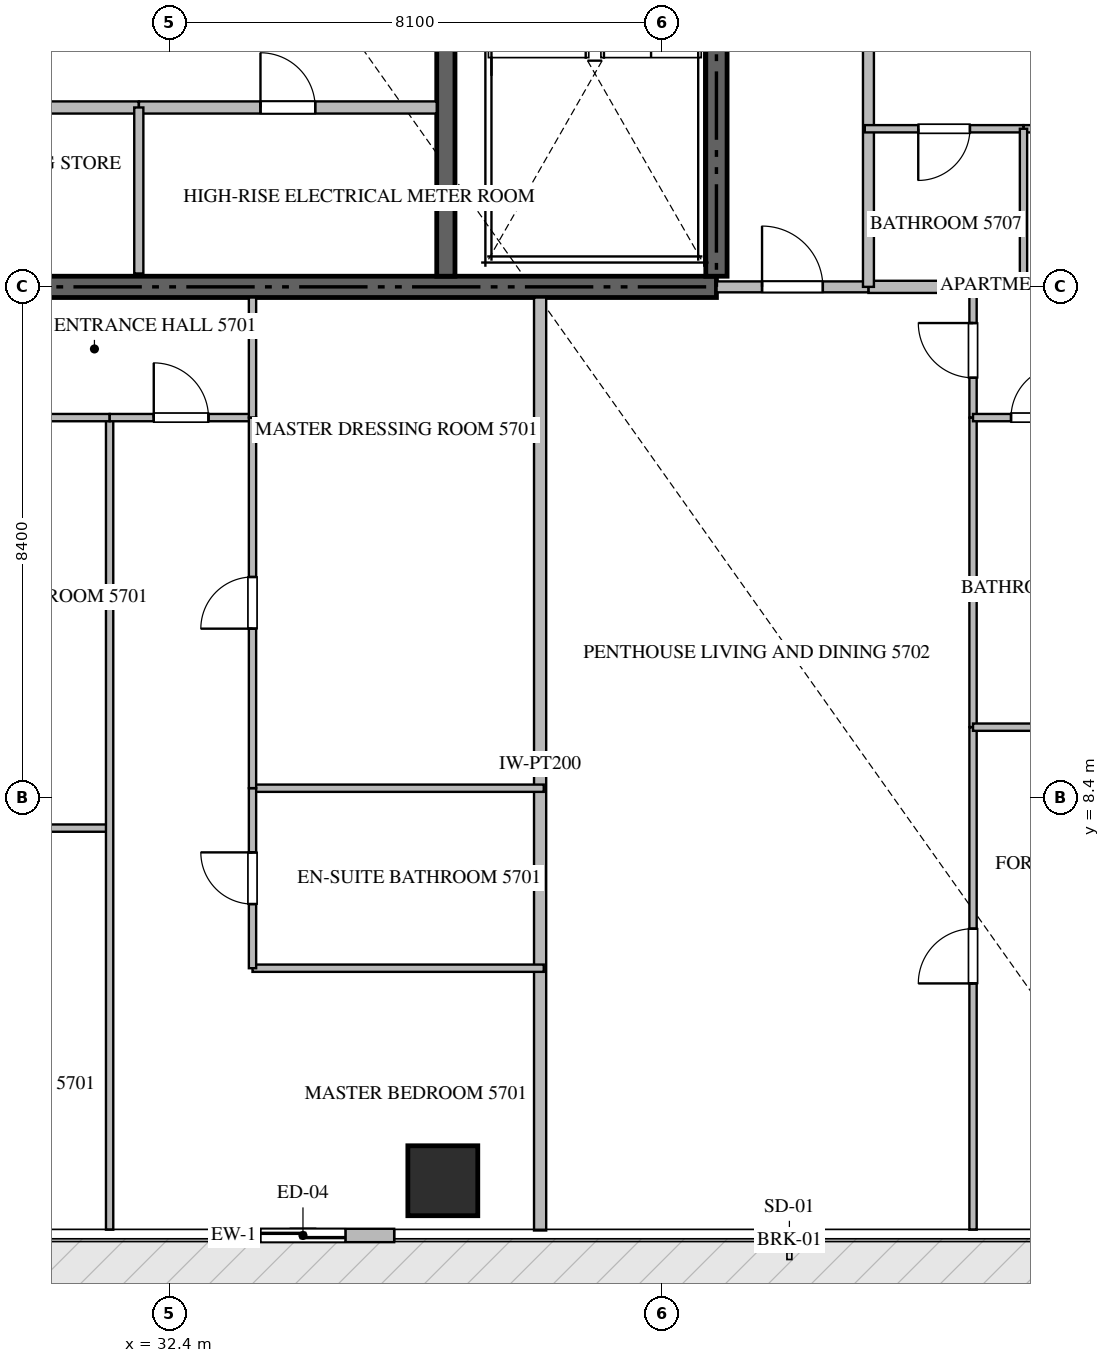
"""IFC4 building model, lengths in metres.
Left out: names, types, materials, properties, quantities, classifications, styles, units other than length and angle.
Written with IfcOpenShell. Run it as: python <this file> out.ifc"""

import sys

from ifc_helpers import new_model, si_unit, direction, frame, frame_2d, origin, origin_2d, place, context, subcontext, project, spatial, rectangle, extrude, source, transform, mapped, element, fill, save


model = new_model("IFC4")
c1 = context("Model", 3, precision=1e-05, world=origin(), true_north=direction((0.0, 1.0)))
c2 = subcontext(c1, "Body", "Model", "MODEL_VIEW")
j1 = project(units=[si_unit("LENGTHUNIT", "METRE"), si_unit("PLANEANGLEUNIT", "RADIAN")], contexts=[c1])
p1 = place(None, origin())
s1 = spatial("IfcSite", under=j1, at=p1, CompositionType="ELEMENT")
p2 = place(p1, origin())
s2 = spatial("IfcBuilding", under=s1, at=p2, CompositionType="ELEMENT")
p3 = place(p2, frame((0.0, 0.0, 229.7)))
s3 = spatial("IfcBuildingStorey", under=s2, at=p3, CompositionType="ELEMENT", Elevation=229.7)
p4 = place(p3, frame((23.4, 16.8, -0.26), z_axis=(0.0, 0.0, 1.0), x_axis=(1.0, 0.0, 0.0)))
e1 = element("IfcWall", 1, at=p4, inside=s3, PredefinedType="SHEAR", context=c2, shape_type="SweptSolid", body=[
    extrude(rectangle(XDim=18.0, YDim=0.35, at=frame_2d((9.0, 0.0))), origin(), (0.0, 0.0, 1.0), 3.848),
])
p5 = place(p3, frame((41.4, 16.975, -0.26), z_axis=(0.0, 0.0, 1.0), x_axis=(0.0, 1.0, 0.0)))
e2 = element("IfcWall", 2, at=p5, inside=s3, PredefinedType="SHEAR", context=c2, shape_type="SweptSolid", body=[
    extrude(rectangle(XDim=8.375, YDim=0.35, at=frame_2d((4.188, 0.0))), origin(), (0.0, 0.0, 1.0), 3.848),
])
p6 = place(p3, frame((36.95, 16.975, -0.26), z_axis=(0.0, 0.0, 1.0), x_axis=(0.0, 1.0, 0.0)))
e3 = element("IfcWall", 3, at=p6, inside=s3, PredefinedType="SHEAR", context=c2, shape_type="SweptSolid", body=[
    extrude(rectangle(XDim=8.375, YDim=0.3, at=frame_2d((4.188, 0.0))), origin(), (0.0, 0.0, 1.0), 3.848),
])
m1 = source(origin(), c2, "Body", "SweptSolid", [
    extrude(rectangle(XDim=1.15, YDim=1.15, at=origin_2d()), origin(), (0.0, 0.0, 1.0), 3.85),
])
p7 = place(p3, frame((36.9, 2.1, -0.26), z_axis=(0.0, 0.0, 1.0), x_axis=(1.0, 0.0, 0.0)))
e4 = element("IfcColumn", 4, at=p7, inside=s3, PredefinedType="COLUMN", context=c2, shape_type="MappedRepresentation", body=[
    mapped(m1, transform((0.0, 0.0, 0.0), scale=1.0)),
])
p8 = place(p3, frame((33.1, 1.2, 0.0), z_axis=(0.0, 0.0, 1.0), x_axis=(1.0, 0.0, 0.0)))
e5 = element("IfcWall", 5, at=p8, inside=s3, PredefinedType="ELEMENTEDWALL", context=c2, shape_type="SweptSolid", body=[
    extrude(rectangle(XDim=3.0, YDim=0.22, at=frame_2d((1.5, 0.0))), origin(), (0.0, 0.0, 1.0), 3.575),
])
p9 = place(p8, frame((0.8, 0.0, 0.0)))
e6 = element("IfcOpeningElement", 6, at=p9, cuts=e5, PredefinedType="OPENING", context=c2, shape_type="SweptSolid", body=[
    extrude(rectangle(XDim=1.4, YDim=2.25, at=frame_2d((0.7, 1.125))), frame((0.0, 0.12, 0.0), z_axis=(0.0, -1.0, 0.0), x_axis=(1.0, 0.0, 0.0)), (0.0, 0.0, 1.0), 0.24),
])
p10 = place(p3, frame((28.0, 19.75, 0.0), z_axis=(0.0, 0.0, 1.0), x_axis=(1.0, 0.0, 0.0)))
e7 = element("IfcWall", 7, at=p10, inside=s3, PredefinedType="STANDARD", context=c2, shape_type="SweptSolid", body=[
    extrude(rectangle(XDim=3.9, YDim=0.2, at=frame_2d((1.95, 0.0))), origin(), (0.0, 0.0, 1.0), 3.59),
])
p11 = place(p10, frame((1.5, 0.0, 0.0)))
e8 = element("IfcOpeningElement", 8, at=p11, cuts=e7, PredefinedType="OPENING", context=c2, shape_type="SweptSolid", body=[
    extrude(rectangle(XDim=0.9, YDim=2.1, at=frame_2d((0.45, 1.05))), frame((0.0, 0.11, 0.0), z_axis=(0.0, -1.0, 0.0), x_axis=(1.0, 0.0, 0.0)), (0.0, 0.0, 1.0), 0.22),
])
p12 = place(p3, frame((31.902, 19.75, 0.0), z_axis=(0.0, 0.0, 1.0), x_axis=(1.0, 0.0, 0.0)))
e9 = element("IfcWall", 9, at=p12, inside=s3, PredefinedType="STANDARD", context=c2, shape_type="SweptSolid", body=[
    extrude(rectangle(XDim=4.898, YDim=0.2, at=frame_2d((2.449, 0.0))), origin(), (0.0, 0.0, 1.0), 3.59),
])
p13 = place(p12, frame((1.999, 0.0, 0.0)))
e10 = element("IfcOpeningElement", 10, at=p13, cuts=e9, PredefinedType="OPENING", context=c2, shape_type="SweptSolid", body=[
    extrude(rectangle(XDim=0.9, YDim=2.1, at=frame_2d((0.45, 1.05))), frame((0.0, 0.11, 0.0), z_axis=(0.0, -1.0, 0.0), x_axis=(1.0, 0.0, 0.0)), (0.0, 0.0, 1.0), 0.22),
])
p14 = place(p3, frame((31.9, 17.02, 0.0), z_axis=(0.0, 0.0, 1.0), x_axis=(0.0, 1.0, 0.0)))
e11 = element("IfcWall", 11, at=p14, inside=s3, PredefinedType="PARTITIONING", context=c2, shape_type="SweptSolid", body=[
    extrude(rectangle(XDim=2.73, YDim=0.15, at=frame_2d((1.365, 0.0))), origin(), (0.0, 0.0, 1.0), 3.59),
])
p15 = place(p3, frame((38.5, 1.282, 0.0), z_axis=(0.0, 0.0, 1.0), x_axis=(0.0, 1.0, 0.0)))
e12 = element("IfcWall", 12, at=p15, inside=s3, PredefinedType="PARTITIONING", context=c2, shape_type="SweptSolid", body=[
    extrude(rectangle(XDim=15.343, YDim=0.2, at=frame_2d((7.671, 0.0))), origin(), (0.0, 0.0, 1.0), 3.59),
])
p16 = place(p3, frame((43.9, 16.8, 0.0), z_axis=(0.0, 0.0, 1.0), x_axis=(1.0, 0.0, 0.0)))
e13 = element("IfcWall", 13, at=p16, inside=s3, PredefinedType="PARTITIONING", context=c2, shape_type="SweptSolid", body=[
    extrude(rectangle(XDim=13.418, YDim=0.2, at=frame_2d((6.709, 0.0))), origin(), (0.0, 0.0, 1.0), 3.59),
])
p17 = place(p3, frame((41.402, 16.8, 0.0), z_axis=(0.0, 0.0, 1.0), x_axis=(1.0, 0.0, 0.0)))
e14 = element("IfcWall", 14, at=p17, inside=s3, PredefinedType="PARTITIONING", context=c2, shape_type="SweptSolid", body=[
    extrude(rectangle(XDim=2.496, YDim=0.18, at=frame_2d((1.248, 0.0))), origin(), (0.0, 0.0, 1.0), 3.59),
])
p18 = place(p17, frame((0.748, 0.0, 0.0)))
e15 = element("IfcOpeningElement", 15, at=p18, cuts=e14, PredefinedType="OPENING", context=c2, shape_type="SweptSolid", body=[
    extrude(rectangle(XDim=1.0, YDim=2.15, at=frame_2d((0.5, 1.075))), frame((0.0, 0.1, 0.0), z_axis=(0.0, -1.0, 0.0), x_axis=(1.0, 0.0, 0.0)), (0.0, 0.0, 1.0), 0.2),
])
p19 = place(p3, frame((43.9, 16.8, 0.0), z_axis=(0.0, 0.0, 1.0), x_axis=(0.0, 1.0, 0.0)))
e16 = element("IfcWall", 16, at=p19, inside=s3, PredefinedType="PARTITIONING", context=c2, shape_type="SweptSolid", body=[
    extrude(rectangle(XDim=16.8, YDim=0.18, at=frame_2d((8.4, 0.0))), origin(), (0.0, 0.0, 1.0), 3.59),
])
p20 = place(p19, frame((4.392, 0.0, 0.0)))
e17 = element("IfcOpeningElement", 17, at=p20, cuts=e16, PredefinedType="OPENING", context=c2, shape_type="SweptSolid", body=[
    extrude(rectangle(XDim=1.0, YDim=2.15, at=frame_2d((0.5, 1.075))), frame((0.0, 0.1, 0.0), z_axis=(0.0, -1.0, 0.0), x_axis=(1.0, 0.0, 0.0)), (0.0, 0.0, 1.0), 0.2),
])
p21 = place(p19, frame((8.595, 0.0, 0.0)))
e18 = element("IfcOpeningElement", 18, at=p21, cuts=e16, PredefinedType="OPENING", context=c2, shape_type="SweptSolid", body=[
    extrude(rectangle(XDim=1.0, YDim=2.15, at=frame_2d((0.5, 1.075))), frame((0.0, 0.1, 0.0), z_axis=(0.0, -1.0, 0.0), x_axis=(1.0, 0.0, 0.0)), (0.0, 0.0, 1.0), 0.2),
])
p22 = place(p3, frame((26.3, 7.899, 0.0), z_axis=(0.0, 0.0, 1.0), x_axis=(1.0, 0.0, 0.0)))
e19 = element("IfcWall", 19, at=p22, inside=s3, PredefinedType="PARTITIONING", context=c2, shape_type="SweptSolid", body=[
    extrude(rectangle(XDim=5.12, YDim=0.12, at=frame_2d((2.56, 0.0))), origin(), (0.0, 0.0, 1.0), 3.59),
])
p23 = place(p3, frame((31.42, 1.295, 0.0), z_axis=(0.0, 0.0, 1.0), x_axis=(0.0, 1.0, 0.0)))
e20 = element("IfcWall", 20, at=p23, inside=s3, PredefinedType="PARTITIONING", context=c2, shape_type="SweptSolid", body=[
    extrude(rectangle(XDim=13.355, YDim=0.12, at=frame_2d((6.677, 0.0))), origin(), (0.0, 0.0, 1.0), 3.59),
])
p24 = place(p3, frame((28.402, 14.65, 0.0), z_axis=(0.0, 0.0, 1.0), x_axis=(1.0, 0.0, 0.0)))
e21 = element("IfcWall", 21, at=p24, inside=s3, PredefinedType="PARTITIONING", context=c2, shape_type="SweptSolid", body=[
    extrude(rectangle(XDim=3.018, YDim=0.12, at=frame_2d((1.509, 0.0))), origin(), (0.0, 0.0, 1.0), 3.59),
])
p25 = place(p24, frame((1.084, 0.0, 0.0)))
e22 = element("IfcOpeningElement", 22, at=p25, cuts=e21, PredefinedType="OPENING", context=c2, shape_type="SweptSolid", body=[
    extrude(rectangle(XDim=0.85, YDim=2.1, at=frame_2d((0.425, 1.05))), frame((0.0, 0.07, 0.0), z_axis=(0.0, -1.0, 0.0), x_axis=(1.0, 0.0, 0.0)), (0.0, 0.0, 1.0), 0.14),
])
p26 = place(p3, frame((31.422, 14.65, 0.0), z_axis=(0.0, 0.0, 1.0), x_axis=(1.0, 0.0, 0.0)))
e23 = element("IfcWall", 23, at=p26, inside=s3, PredefinedType="PARTITIONING", context=c2, shape_type="SweptSolid", body=[
    extrude(rectangle(XDim=2.348, YDim=0.12, at=frame_2d((1.174, 0.0))), origin(), (0.0, 0.0, 1.0), 3.59),
])
p27 = place(p26, frame((0.724, 0.0, 0.0)))
e24 = element("IfcOpeningElement", 24, at=p27, cuts=e23, PredefinedType="OPENING", context=c2, shape_type="SweptSolid", body=[
    extrude(rectangle(XDim=0.9, YDim=2.1, at=frame_2d((0.45, 1.05))), frame((0.0, 0.07, 0.0), z_axis=(0.0, -1.0, 0.0), x_axis=(1.0, 0.0, 0.0)), (0.0, 0.0, 1.0), 0.14),
])
for number, where, z_axis, x_axis in (
    (25, (33.77, 5.595, 0.0), (0.0, 0.0, 1.0), (1.0, 0.0, 0.0)),
    (26, (33.77, 8.555, 0.0), (0.0, 0.0, 1.0), (1.0, 0.0, 0.0)),
):
    element("IfcWall", number, at=place(p3, frame(where, z_axis=z_axis, x_axis=x_axis)), inside=s3, PredefinedType="PARTITIONING", context=c2, shape_type="SweptSolid", body=[
        extrude(rectangle(XDim=4.79, YDim=0.12, at=frame_2d((2.395, 0.0))), origin(), (0.0, 0.0, 1.0), 3.59),
    ])
p28 = place(p3, frame((33.77, 5.595, 0.0), z_axis=(0.0, 0.0, 1.0), x_axis=(0.0, 1.0, 0.0)))
e27 = element("IfcWall", 27, at=p28, inside=s3, PredefinedType="PARTITIONING", context=c2, shape_type="SweptSolid", body=[
    extrude(rectangle(XDim=2.96, YDim=0.12, at=frame_2d((1.48, 0.0))), origin(), (0.0, 0.0, 1.0), 3.59),
])
p29 = place(p28, frame((1.055, 0.0, 0.0)))
e28 = element("IfcOpeningElement", 28, at=p29, cuts=e27, PredefinedType="OPENING", context=c2, shape_type="SweptSolid", body=[
    extrude(rectangle(XDim=0.85, YDim=2.1, at=frame_2d((0.425, 1.05))), frame((0.0, 0.07, 0.0), z_axis=(0.0, -1.0, 0.0), x_axis=(1.0, 0.0, 0.0)), (0.0, 0.0, 1.0), 0.14),
])
p30 = place(p3, frame((33.77, 8.557, 0.0), z_axis=(0.0, 0.0, 1.0), x_axis=(0.0, 1.0, 0.0)))
e29 = element("IfcWall", 29, at=p30, inside=s3, PredefinedType="PARTITIONING", context=c2, shape_type="SweptSolid", body=[
    extrude(rectangle(XDim=6.093, YDim=0.12, at=frame_2d((3.046, 0.0))), origin(), (0.0, 0.0, 1.0), 3.59),
])
p31 = place(p30, frame((2.622, 0.0, 0.0)))
e30 = element("IfcOpeningElement", 30, at=p31, cuts=e29, PredefinedType="OPENING", context=c2, shape_type="SweptSolid", body=[
    extrude(rectangle(XDim=0.85, YDim=2.1, at=frame_2d((0.425, 1.05))), frame((0.0, 0.07, 0.0), z_axis=(0.0, -1.0, 0.0), x_axis=(1.0, 0.0, 0.0)), (0.0, 0.0, 1.0), 0.14),
])
p32 = place(p3, frame((33.77, 14.652, 0.0), z_axis=(0.0, 0.0, 1.0), x_axis=(0.0, 1.0, 0.0)))
e31 = element("IfcWall", 31, at=p32, inside=s3, PredefinedType="PARTITIONING", context=c2, shape_type="SweptSolid", body=[
    extrude(rectangle(XDim=1.973, YDim=0.12, at=frame_2d((0.986, 0.0))), origin(), (0.0, 0.0, 1.0), 3.59),
])
p33 = place(p3, frame((45.62, 14.65, 0.0), z_axis=(0.0, 0.0, 1.0), x_axis=(0.0, 1.0, 0.0)))
e32 = element("IfcWall", 32, at=p33, inside=s3, PredefinedType="PARTITIONING", context=c2, shape_type="SweptSolid", body=[
    extrude(rectangle(XDim=2.21, YDim=0.12, at=frame_2d((1.105, 0.0))), origin(), (0.0, 0.0, 1.0), 3.59),
])
p34 = place(p33, frame((0.655, 0.0, 0.0)))
e33 = element("IfcOpeningElement", 33, at=p34, cuts=e32, PredefinedType="OPENING", context=c2, shape_type="SweptSolid", body=[
    extrude(rectangle(XDim=0.9, YDim=2.1, at=frame_2d((0.45, 1.05))), frame((0.0, 0.07, 0.0), z_axis=(0.0, -1.0, 0.0), x_axis=(1.0, 0.0, 0.0)), (0.0, 0.0, 1.0), 0.14),
])
p35 = place(p3, frame((45.62, 1.295, 0.0), z_axis=(0.0, 0.0, 1.0), x_axis=(0.0, 1.0, 0.0)))
e34 = element("IfcWall", 34, at=p35, inside=s3, PredefinedType="PARTITIONING", context=c2, shape_type="SweptSolid", body=[
    extrude(rectangle(XDim=8.264, YDim=0.12, at=frame_2d((4.132, 0.0))), origin(), (0.0, 0.0, 1.0), 3.59),
])
p36 = place(p35, frame((4.05, 0.0, 0.0)))
e35 = element("IfcOpeningElement", 35, at=p36, cuts=e34, PredefinedType="OPENING", context=c2, shape_type="SweptSolid", body=[
    extrude(rectangle(XDim=0.9, YDim=2.1, at=frame_2d((0.45, 1.05))), frame((0.0, 0.07, 0.0), z_axis=(0.0, -1.0, 0.0), x_axis=(1.0, 0.0, 0.0)), (0.0, 0.0, 1.0), 0.14),
])
p37 = place(p3, frame((45.62, 9.561, 0.0), z_axis=(0.0, 0.0, 1.0), x_axis=(0.0, 1.0, 0.0)))
e36 = element("IfcWall", 36, at=p37, inside=s3, PredefinedType="PARTITIONING", context=c2, shape_type="SweptSolid", body=[
    extrude(rectangle(XDim=5.087, YDim=0.12, at=frame_2d((2.543, 0.0))), origin(), (0.0, 0.0, 1.0), 3.59),
])
p38 = place(p3, frame((45.62, 9.559, 0.0), z_axis=(0.0, 0.0, 1.0), x_axis=(1.0, 0.0, 0.0)))
e37 = element("IfcWall", 37, at=p38, inside=s3, PredefinedType="PARTITIONING", context=c2, shape_type="SweptSolid", body=[
    extrude(rectangle(XDim=4.88, YDim=0.12, at=frame_2d((2.44, 0.0))), origin(), (0.0, 0.0, 1.0), 3.59),
])
p39 = place(p3, frame((45.62, 14.65, 0.0), z_axis=(0.0, 0.0, 1.0), x_axis=(1.0, 0.0, 0.0)))
e38 = element("IfcWall", 38, at=p39, inside=s3, PredefinedType="PARTITIONING", context=c2, shape_type="SweptSolid", body=[
    extrude(rectangle(XDim=2.1, YDim=0.12, at=frame_2d((1.05, 0.0))), origin(), (0.0, 0.0, 1.0), 3.59),
])
p40 = place(p39, frame((0.625, 0.0, 0.0)))
e39 = element("IfcOpeningElement", 39, at=p40, cuts=e38, PredefinedType="OPENING", context=c2, shape_type="SweptSolid", body=[
    extrude(rectangle(XDim=0.85, YDim=2.1, at=frame_2d((0.425, 1.05))), frame((0.0, 0.07, 0.0), z_axis=(0.0, -1.0, 0.0), x_axis=(1.0, 0.0, 0.0)), (0.0, 0.0, 1.0), 0.14),
])
p41 = place(p3, frame((49.05, 19.4, 0.0), z_axis=(0.0, 0.0, 1.0), x_axis=(-1.0, 0.0, 0.0)))
e40 = element("IfcWall", 40, at=p41, inside=s3, PredefinedType="PARTITIONING", context=c2, shape_type="SweptSolid", body=[
    extrude(rectangle(XDim=2.6, YDim=0.12, at=frame_2d((1.3, 0.0))), origin(), (0.0, 0.0, 1.0), 3.59),
])
p42 = place(p41, frame((0.875, 0.0, 0.0)))
e41 = element("IfcOpeningElement", 41, at=p42, cuts=e40, PredefinedType="OPENING", context=c2, shape_type="SweptSolid", body=[
    extrude(rectangle(XDim=0.85, YDim=2.1, at=frame_2d((0.425, 1.05))), frame((0.0, 0.07, 0.0), z_axis=(0.0, -1.0, 0.0), x_axis=(1.0, 0.0, 0.0)), (0.0, 0.0, 1.0), 0.14),
])
p43 = place(p3, frame((46.448, 19.4, 0.0), z_axis=(0.0, 0.0, 1.0), x_axis=(-1.0, 0.0, 0.0)))
e42 = element("IfcWall", 42, at=p43, inside=s3, PredefinedType="PARTITIONING", context=c2, shape_type="SweptSolid", body=[
    extrude(rectangle(XDim=2.608, YDim=0.12, at=frame_2d((1.304, 0.0))), origin(), (0.0, 0.0, 1.0), 3.59),
])
p44 = place(p43, frame((0.879, 0.0, 0.0)))
e43 = element("IfcOpeningElement", 43, at=p44, cuts=e42, PredefinedType="OPENING", context=c2, shape_type="SweptSolid", body=[
    extrude(rectangle(XDim=0.85, YDim=2.1, at=frame_2d((0.425, 1.05))), frame((0.0, 0.07, 0.0), z_axis=(0.0, -1.0, 0.0), x_axis=(1.0, 0.0, 0.0)), (0.0, 0.0, 1.0), 0.14),
])
p45 = place(p3, frame((46.45, 16.74, 0.0), z_axis=(0.0, 0.0, 1.0), x_axis=(0.0, 1.0, 0.0)))
e44 = element("IfcWall", 44, at=p45, inside=s3, PredefinedType="PARTITIONING", context=c2, shape_type="SweptSolid", body=[
    extrude(rectangle(XDim=2.66, YDim=0.12, at=frame_2d((1.33, 0.0))), origin(), (0.0, 0.0, 1.0), 3.59),
])
m2 = source(origin(), c2, "Body", "SweptSolid", [
    extrude(rectangle(XDim=1.4, YDim=2.25, at=frame_2d((0.7, 1.125))), frame((0.0, 0.025, 0.0), z_axis=(0.0, -1.0, 0.0), x_axis=(1.0, 0.0, 0.0)), (0.0, 0.0, 1.0), 0.05),
])
p46 = place(p9, origin())
e45 = element("IfcDoor", 45, at=p46, inside=s3, OperationType="SLIDING_TO_LEFT", PredefinedType="DOOR", context=c2, shape_type="MappedRepresentation", body=[
    mapped(m2, transform((0.0, 0.0, 0.0), scale=1.0)),
])
fill(e6, e45)
m3 = source(origin(), c2, "Body", "SweptSolid", [
    extrude(rectangle(XDim=0.9, YDim=2.1, at=frame_2d((0.45, 1.05))), frame((0.0, 0.025, 0.0), z_axis=(0.0, -1.0, 0.0), x_axis=(1.0, 0.0, 0.0)), (0.0, 0.0, 1.0), 0.05),
])
p47 = place(p13, origin())
e46 = element("IfcDoor", 46, at=p47, inside=s3, OperationType="SINGLE_SWING_LEFT", PredefinedType="DOOR", context=c2, shape_type="MappedRepresentation", body=[
    mapped(m3, transform((0.0, 0.0, 0.0), scale=1.0)),
])
fill(e10, e46)
m4 = source(origin(), c2, "Body", "SweptSolid", [
    extrude(rectangle(XDim=1.0, YDim=2.15, at=frame_2d((0.5, 1.075))), frame((0.0, 0.025, 0.0), z_axis=(0.0, -1.0, 0.0), x_axis=(1.0, 0.0, 0.0)), (0.0, 0.0, 1.0), 0.05),
])
p48 = place(p18, origin())
e47 = element("IfcDoor", 47, at=p48, inside=s3, OperationType="SINGLE_SWING_LEFT", PredefinedType="DOOR", context=c2, shape_type="MappedRepresentation", body=[
    mapped(m4, transform((0.0, 0.0, 0.0), scale=1.0)),
])
fill(e15, e47)
p49 = place(p27, origin())
e48 = element("IfcDoor", 48, at=p49, inside=s3, OperationType="SINGLE_SWING_LEFT", PredefinedType="DOOR", context=c2, shape_type="MappedRepresentation", body=[
    mapped(m3, transform((0.0, 0.0, 0.0), scale=1.0)),
])
fill(e24, e48)
m5 = source(origin(), c2, "Body", "SweptSolid", [
    extrude(rectangle(XDim=0.85, YDim=2.1, at=frame_2d((0.425, 1.05))), frame((0.0, 0.025, 0.0), z_axis=(0.0, -1.0, 0.0), x_axis=(1.0, 0.0, 0.0)), (0.0, 0.0, 1.0), 0.05),
])
p50 = place(p29, origin())
e49 = element("IfcDoor", 49, at=p50, inside=s3, OperationType="SINGLE_SWING_RIGHT", PredefinedType="DOOR", context=c2, shape_type="MappedRepresentation", body=[
    mapped(m5, transform((0.0, 0.0, 0.0), scale=1.0)),
])
fill(e28, e49)
p51 = place(p31, origin())
e50 = element("IfcDoor", 50, at=p51, inside=s3, OperationType="SINGLE_SWING_LEFT", PredefinedType="DOOR", context=c2, shape_type="MappedRepresentation", body=[
    mapped(m5, transform((0.0, 0.0, 0.0), scale=1.0)),
])
fill(e30, e50)
p52 = place(p34, origin())
e51 = element("IfcDoor", 51, at=p52, inside=s3, OperationType="SINGLE_SWING_RIGHT", PredefinedType="DOOR", context=c2, shape_type="MappedRepresentation", body=[
    mapped(m3, transform((0.0, 0.0, 0.0), scale=1.0)),
])
fill(e33, e51)
p53 = place(p36, origin())
e52 = element("IfcDoor", 52, at=p53, inside=s3, OperationType="SINGLE_SWING_LEFT", PredefinedType="DOOR", context=c2, shape_type="MappedRepresentation", body=[
    mapped(m3, transform((0.0, 0.0, 0.0), scale=1.0)),
])
fill(e35, e52)
p54 = place(p40, origin())
e53 = element("IfcDoor", 53, at=p54, inside=s3, OperationType="SINGLE_SWING_RIGHT", PredefinedType="DOOR", context=c2, shape_type="MappedRepresentation", body=[
    mapped(m5, transform((0.0, 0.0, 0.0), scale=1.0)),
])
fill(e39, e53)
p55 = place(p44, origin())
e54 = element("IfcDoor", 54, at=p55, inside=s3, OperationType="SINGLE_SWING_RIGHT", PredefinedType="DOOR", context=c2, shape_type="MappedRepresentation", body=[
    mapped(m5, transform((0.0, 0.0, 0.0), scale=1.0)),
])
fill(e43, e54)
save(model, sys.argv[1])
